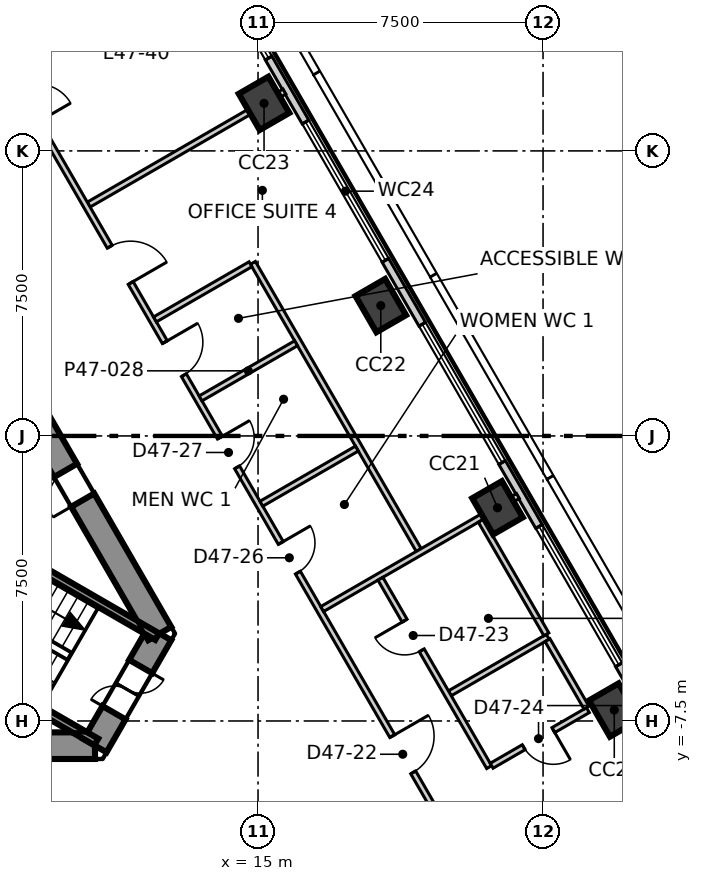
"""IFC4 building model, lengths in metres.
Left out: names, types, materials, properties, quantities, classifications, styles, units other than length and angle.
Written with IfcOpenShell. Run it as: python <this file> out.ifc"""

import sys

from ifc_helpers import new_model, si_unit, direction, frame, frame_2d, origin, origin_2d, place, context, subcontext, project, spatial, polyline, rectangle, outline, extrude, element, fill, save


model = new_model("IFC4")
c1 = context("Model", 3, precision=1e-05, world=origin(), true_north=direction((0.0, 1.0)))
c2 = subcontext(c1, "Body", "Model", "MODEL_VIEW")
j1 = project(units=[si_unit("LENGTHUNIT", "METRE"), si_unit("PLANEANGLEUNIT", "RADIAN")], contexts=[c1])
p1 = place(None, origin())
s1 = spatial("IfcSite", under=j1, at=p1, CompositionType="ELEMENT")
p2 = place(p1, origin())
s2 = spatial("IfcBuilding", under=s1, at=p2, CompositionType="ELEMENT")
p3 = place(p2, frame((0.0, 0.0, 203.3)))
s3 = spatial("IfcBuildingStorey", under=s2, at=p3, CompositionType="ELEMENT", Elevation=203.3)
p4 = place(p3, frame((-10.71, -8.15, -0.3), z_axis=(0.0, 0.0, 1.0), x_axis=(1.0, 0.0, 0.0)))
e1 = element("IfcWall", 1, at=p4, inside=s3, PredefinedType="SHEAR", context=c2, shape_type="SweptSolid", body=[
    extrude(outline(polyline([(-0.202, -0.35), (1.782, -0.35), (3.766, -0.35), (5.75, -0.35), (7.734, -0.35), (9.718, -0.35), (11.702, -0.35), (13.686, -0.35), (15.67, -0.35), (17.654, -0.35), (19.638, -0.35), (21.622, -0.35), (21.218, 0.35), (19.307, 0.35), (17.397, 0.35), (15.486, 0.35), (13.576, 0.35), (11.665, 0.35), (9.755, 0.35), (7.844, 0.35), (5.934, 0.35), (4.023, 0.35), (2.113, 0.35), (0.202, 0.35), (-0.202, -0.35)])), origin(), (0.0, 0.0, 1.0), 4.0),
])
p5 = place(p4, frame((9.81, 0.0, 0.3)))
e2 = element("IfcOpeningElement", 2, at=p5, cuts=e1, PredefinedType="OPENING", context=c2, shape_type="SweptSolid", body=[
    extrude(rectangle(XDim=1.8, YDim=2.1, at=frame_2d((0.9, 1.05))), frame((0.0, 0.36, 0.0), z_axis=(0.0, -1.0, 0.0), x_axis=(1.0, 0.0, 0.0)), (0.0, 0.0, 1.0), 0.72),
])
p6 = place(p3, frame((10.71, -8.15, -0.3), z_axis=(0.0, 0.0, 1.0), x_axis=(0.49999337185, 0.866029230515, 0.0)))
e3 = element("IfcWall", 3, at=p6, inside=s3, PredefinedType="SHEAR", context=c2, shape_type="SweptSolid", body=[
    extrude(outline(polyline([(-0.202, -0.35), (1.703, -0.35), (3.608, -0.35), (3.204, 0.35), (1.703, 0.35), (0.202, 0.35), (-0.202, -0.35)])), origin(), (0.0, 0.0, 1.0), 4.0),
])
p7 = place(p6, frame((1.003, 0.0, 0.3)))
e4 = element("IfcOpeningElement", 4, at=p7, cuts=e3, PredefinedType="OPENING", context=c2, shape_type="SweptSolid", body=[
    extrude(rectangle(XDim=1.4, YDim=2.1, at=frame_2d((0.7, 1.05))), frame((0.0, 0.36, 0.0), z_axis=(0.0, -1.0, 0.0), x_axis=(1.0, 0.0, 0.0)), (0.0, 0.0, 1.0), 0.72),
])
p8 = place(p3, frame((12.413, -5.2, -0.3), z_axis=(0.0, 0.0, 1.0), x_axis=(-0.500011533395, 0.866018744874, 0.0)))
e5 = element("IfcWall", 5, at=p8, inside=s3, PredefinedType="SHEAR", context=c2, shape_type="SweptSolid", body=[
    extrude(outline(polyline([(-0.202, -0.35), (1.782, -0.35), (3.766, -0.35), (5.75, -0.35), (7.734, -0.35), (9.718, -0.35), (11.702, -0.35), (13.686, -0.35), (15.67, -0.35), (17.654, -0.35), (19.638, -0.35), (21.622, -0.35), (21.218, 0.35), (19.307, 0.35), (17.397, 0.35), (15.486, 0.35), (13.576, 0.35), (11.665, 0.35), (9.755, 0.35), (7.844, 0.35), (5.934, 0.35), (4.023, 0.35), (2.113, 0.35), (0.202, 0.35), (-0.202, -0.35)])), origin(), (0.0, 0.0, 1.0), 4.0),
])
p9 = place(p8, frame((4.055, 0.0, 0.3)))
e6 = element("IfcOpeningElement", 6, at=p9, cuts=e5, PredefinedType="OPENING", context=c2, shape_type="SweptSolid", body=[
    extrude(rectangle(XDim=0.9, YDim=2.1, at=frame_2d((0.45, 1.05))), frame((0.0, 0.36, 0.0), z_axis=(0.0, -1.0, 0.0), x_axis=(1.0, 0.0, 0.0)), (0.0, 0.0, 1.0), 0.72),
])
p10 = place(p8, frame((16.415, 0.0, 0.3)))
e7 = element("IfcOpeningElement", 7, at=p10, cuts=e5, PredefinedType="OPENING", context=c2, shape_type="SweptSolid", body=[
    extrude(rectangle(XDim=1.0, YDim=2.1, at=frame_2d((0.5, 1.05))), frame((0.0, 0.36, 0.0), z_axis=(0.0, -1.0, 0.0), x_axis=(1.0, 0.0, 0.0)), (0.0, 0.0, 1.0), 0.72),
])
for number, where, z_axis, x_axis in (
    (8, (24.374, -7.212, -0.3), (0.0, 0.0, 1.0), (-0.5, 0.866, 0.0)),
    (9, (21.302, -1.891, -0.3), (0.0, 0.0, 1.0), (-0.5, 0.866, 0.0)),
    (10, (18.23, 3.43, -0.3), (0.0, 0.0, 1.0), (-0.5, 0.866, 0.0)),
    (11, (15.158, 8.751, -0.3), (0.0, 0.0, 1.0), (-0.5, 0.866, 0.0)),
):
    element("IfcColumn", number, at=place(p3, frame(where, z_axis=z_axis, x_axis=x_axis)), inside=s3, PredefinedType="COLUMN", context=c2, shape_type="SweptSolid", body=[
        extrude(rectangle(XDim=1.1, YDim=0.9, at=origin_2d()), origin(), (0.0, 0.0, 1.0), 4.0),
    ])
p11 = place(p3, frame((28.704, -13.311, 0.0), z_axis=(0.0, 0.0, 1.0), x_axis=(-0.500010281129, 0.866019467891, 0.0)))
e12 = element("IfcWall", 12, at=p11, inside=s3, PredefinedType="ELEMENTEDWALL", context=c2, shape_type="SweptSolid", body=[
    extrude(rectangle(XDim=51.739, YDim=0.2, at=frame_2d((25.87, 0.0))), origin(), (0.0, 0.0, 1.0), 3.7),
])
p12 = place(p11, frame((2.275, 0.0, 0.9)))
e13 = element("IfcOpeningElement", 13, at=p12, cuts=e12, PredefinedType="OPENING", context=c2, shape_type="SweptSolid", body=[
    extrude(rectangle(XDim=4.2, YDim=2.5, at=frame_2d((2.1, 1.25))), frame((0.0, 0.11, 0.0), z_axis=(0.0, -1.0, 0.0), x_axis=(1.0, 0.0, 0.0)), (0.0, 0.0, 1.0), 0.22),
])
p13 = place(p11, frame((8.419, 0.0, 0.9)))
e14 = element("IfcOpeningElement", 14, at=p13, cuts=e12, PredefinedType="OPENING", context=c2, shape_type="SweptSolid", body=[
    extrude(rectangle(XDim=4.2, YDim=2.5, at=frame_2d((2.1, 1.25))), frame((0.0, 0.11, 0.0), z_axis=(0.0, -1.0, 0.0), x_axis=(1.0, 0.0, 0.0)), (0.0, 0.0, 1.0), 0.22),
])
p14 = place(p11, frame((14.563, 0.0, 0.9)))
e15 = element("IfcOpeningElement", 15, at=p14, cuts=e12, PredefinedType="OPENING", context=c2, shape_type="SweptSolid", body=[
    extrude(rectangle(XDim=4.2, YDim=2.5, at=frame_2d((2.1, 1.25))), frame((0.0, 0.11, 0.0), z_axis=(0.0, -1.0, 0.0), x_axis=(1.0, 0.0, 0.0)), (0.0, 0.0, 1.0), 0.22),
])
p15 = place(p11, frame((20.707, 0.0, 0.9)))
e16 = element("IfcOpeningElement", 16, at=p15, cuts=e12, PredefinedType="OPENING", context=c2, shape_type="SweptSolid", body=[
    extrude(rectangle(XDim=4.2, YDim=2.5, at=frame_2d((2.1, 1.25))), frame((0.0, 0.11, 0.0), z_axis=(0.0, -1.0, 0.0), x_axis=(1.0, 0.0, 0.0)), (0.0, 0.0, 1.0), 0.22),
])
p16 = place(p11, frame((26.852, 0.0, 0.9)))
e17 = element("IfcOpeningElement", 17, at=p16, cuts=e12, PredefinedType="OPENING", context=c2, shape_type="SweptSolid", body=[
    extrude(rectangle(XDim=4.2, YDim=2.5, at=frame_2d((2.1, 1.25))), frame((0.0, 0.11, 0.0), z_axis=(0.0, -1.0, 0.0), x_axis=(1.0, 0.0, 0.0)), (0.0, 0.0, 1.0), 0.22),
])
p17 = place(p11, frame((32.996, 0.0, 0.9)))
e18 = element("IfcOpeningElement", 18, at=p17, cuts=e12, PredefinedType="OPENING", context=c2, shape_type="SweptSolid", body=[
    extrude(rectangle(XDim=4.2, YDim=2.5, at=frame_2d((2.1, 1.25))), frame((0.0, 0.11, 0.0), z_axis=(0.0, -1.0, 0.0), x_axis=(1.0, 0.0, 0.0)), (0.0, 0.0, 1.0), 0.22),
])
p18 = place(p11, frame((39.14, 0.0, 0.9)))
e19 = element("IfcOpeningElement", 19, at=p18, cuts=e12, PredefinedType="OPENING", context=c2, shape_type="SweptSolid", body=[
    extrude(rectangle(XDim=4.2, YDim=2.5, at=frame_2d((2.1, 1.25))), frame((0.0, 0.11, 0.0), z_axis=(0.0, -1.0, 0.0), x_axis=(1.0, 0.0, 0.0)), (0.0, 0.0, 1.0), 0.22),
])
p19 = place(p11, frame((45.284, 0.0, 0.9)))
e20 = element("IfcOpeningElement", 20, at=p19, cuts=e12, PredefinedType="OPENING", context=c2, shape_type="SweptSolid", body=[
    extrude(rectangle(XDim=4.2, YDim=2.5, at=frame_2d((2.1, 1.25))), frame((0.0, 0.11, 0.0), z_axis=(0.0, -1.0, 0.0), x_axis=(1.0, 0.0, 0.0)), (0.0, 0.0, 1.0), 0.22),
])
p20 = place(p3, frame((10.544, 6.087, 0.0), z_axis=(0.0, 0.0, 1.0), x_axis=(0.866016753976, 0.500014981608, 0.0)))
e21 = element("IfcWall", 21, at=p20, inside=s3, PredefinedType="PARTITIONING", context=c2, shape_type="SweptSolid", body=[
    extrude(rectangle(XDim=5.948, YDim=0.15, at=frame_2d((2.974, 0.0))), origin(), (0.0, 0.0, 1.0), 3.2),
])
p21 = place(p3, frame((0.075, 24.07, 0.0), z_axis=(0.0, 0.0, 1.0), x_axis=(0.500006834213, -0.866021458014, 0.0)))
e22 = element("IfcWall", 22, at=p21, inside=s3, PredefinedType="PARTITIONING", context=c2, shape_type="SweptSolid", body=[
    extrude(rectangle(XDim=41.616, YDim=0.15, at=frame_2d((20.808, 0.0))), origin(), (0.0, 0.0, 1.0), 3.7),
])
p22 = place(p21, frame((36.915, 0.0, 0.0)))
e23 = element("IfcOpeningElement", 23, at=p22, cuts=e22, PredefinedType="OPENING", context=c2, shape_type="SweptSolid", body=[
    extrude(rectangle(XDim=1.1, YDim=2.1, at=frame_2d((0.55, 1.05))), frame((0.0, 0.085, 0.0), z_axis=(0.0, -1.0, 0.0), x_axis=(1.0, 0.0, 0.0)), (0.0, 0.0, 1.0), 0.17),
])
p23 = place(p21, frame((22.046, 0.0, 0.0)))
e24 = element("IfcOpeningElement", 24, at=p23, cuts=e22, PredefinedType="OPENING", context=c2, shape_type="SweptSolid", body=[
    extrude(rectangle(XDim=1.1, YDim=2.1, at=frame_2d((0.55, 1.05))), frame((0.0, 0.085, 0.0), z_axis=(0.0, -1.0, 0.0), x_axis=(1.0, 0.0, 0.0)), (0.0, 0.0, 1.0), 0.17),
])
p24 = place(p21, frame((31.046, 0.0, 0.0)))
e25 = element("IfcOpeningElement", 25, at=p24, cuts=e22, PredefinedType="OPENING", context=c2, shape_type="SweptSolid", body=[
    extrude(rectangle(XDim=0.9, YDim=2.1, at=frame_2d((0.45, 1.05))), frame((0.0, 0.085, 0.0), z_axis=(0.0, -1.0, 0.0), x_axis=(1.0, 0.0, 0.0)), (0.0, 0.0, 1.0), 0.17),
])
p25 = place(p21, frame((27.846, 0.0, 0.0)))
e26 = element("IfcOpeningElement", 26, at=p25, cuts=e22, PredefinedType="OPENING", context=c2, shape_type="SweptSolid", body=[
    extrude(rectangle(XDim=0.9, YDim=2.1, at=frame_2d((0.45, 1.05))), frame((0.0, 0.085, 0.0), z_axis=(0.0, -1.0, 0.0), x_axis=(1.0, 0.0, 0.0)), (0.0, 0.0, 1.0), 0.17),
])
p26 = place(p21, frame((24.946, 0.0, 0.0)))
e27 = element("IfcOpeningElement", 27, at=p26, cuts=e22, PredefinedType="OPENING", context=c2, shape_type="SweptSolid", body=[
    extrude(rectangle(XDim=1.0, YDim=2.1, at=frame_2d((0.5, 1.05))), frame((0.0, 0.085, 0.0), z_axis=(0.0, -1.0, 0.0), x_axis=(1.0, 0.0, 0.0)), (0.0, 0.0, 1.0), 0.17),
])
p27 = place(p21, frame((17.258, 0.0, 0.0)))
e28 = element("IfcOpeningElement", 28, at=p27, cuts=e22, PredefinedType="OPENING", context=c2, shape_type="SweptSolid", body=[
    extrude(rectangle(XDim=1.0, YDim=2.1, at=frame_2d((0.5, 1.05))), frame((0.0, 0.085, 0.0), z_axis=(0.0, -1.0, 0.0), x_axis=(1.0, 0.0, 0.0)), (0.0, 0.0, 1.0), 0.17),
])
p28 = place(p21, frame((11.114, 0.0, 0.0)))
e29 = element("IfcOpeningElement", 29, at=p28, cuts=e22, PredefinedType="OPENING", context=c2, shape_type="SweptSolid", body=[
    extrude(rectangle(XDim=1.0, YDim=2.1, at=frame_2d((0.5, 1.05))), frame((0.0, 0.085, 0.0), z_axis=(0.0, -1.0, 0.0), x_axis=(1.0, 0.0, 0.0)), (0.0, 0.0, 1.0), 0.17),
])
p29 = place(p21, frame((3.669, 0.0, 0.0)))
e30 = element("IfcOpeningElement", 30, at=p29, cuts=e22, PredefinedType="OPENING", context=c2, shape_type="SweptSolid", body=[
    extrude(rectangle(XDim=1.0, YDim=2.1, at=frame_2d((0.5, 1.05))), frame((0.0, 0.085, 0.0), z_axis=(0.0, -1.0, 0.0), x_axis=(1.0, 0.0, 0.0)), (0.0, 0.0, 1.0), 0.17),
])
p30 = place(p3, frame((14.865, 4.554, 0.0), z_axis=(0.0, 0.0, 1.0), x_axis=(0.500054279689, -0.865994063124, 0.0)))
e31 = element("IfcWall", 31, at=p30, inside=s3, PredefinedType="PARTITIONING", context=c2, shape_type="SweptSolid", body=[
    extrude(rectangle(XDim=8.725, YDim=0.15, at=frame_2d((4.363, 0.0))), origin(), (0.0, 0.0, 1.0), 3.7),
])
p31 = place(p3, frame((12.288, 3.066, 0.0), z_axis=(0.0, 0.0, 1.0), x_axis=(0.865976813117, 0.500084152062, 0.0)))
e32 = element("IfcWall", 32, at=p31, inside=s3, PredefinedType="PARTITIONING", context=c2, shape_type="SweptSolid", body=[
    extrude(rectangle(XDim=2.902, YDim=0.15, at=frame_2d((1.451, 0.0))), origin(), (0.0, 0.0, 1.0), 3.7),
])
p32 = place(p3, frame((13.488, 0.988, 0.0), z_axis=(0.0, 0.0, 1.0), x_axis=(0.866158966803, 0.499768590677, 0.0)))
e33 = element("IfcWall", 33, at=p32, inside=s3, PredefinedType="PARTITIONING", context=c2, shape_type="SweptSolid", body=[
    extrude(rectangle(XDim=2.901, YDim=0.15, at=frame_2d((1.451, 0.0))), origin(), (0.0, 0.0, 1.0), 3.7),
])
p33 = place(p3, frame((15.088, -1.784, 0.0), z_axis=(0.0, 0.0, 1.0), x_axis=(0.866034280428, 0.499984624887, 0.0)))
e34 = element("IfcWall", 34, at=p33, inside=s3, PredefinedType="PARTITIONING", context=c2, shape_type="SweptSolid", body=[
    extrude(rectangle(XDim=2.902, YDim=0.15, at=frame_2d((1.451, 0.0))), origin(), (0.0, 0.0, 1.0), 3.7),
])
p34 = place(p3, frame((16.688, -4.555, 0.0), z_axis=(0.0, 0.0, 1.0), x_axis=(0.866034527326, 0.49998419723, 0.0)))
e35 = element("IfcWall", 35, at=p34, inside=s3, PredefinedType="PARTITIONING", context=c2, shape_type="SweptSolid", body=[
    extrude(rectangle(XDim=5.948, YDim=0.15, at=frame_2d((2.974, 0.0))), origin(), (0.0, 0.0, 1.0), 3.7),
])
p35 = place(p3, frame((20.047, -6.772, 0.0), z_axis=(0.0, 0.0, 1.0), x_axis=(0.865987462095, 0.500065711177, 0.0)))
e36 = element("IfcWall", 36, at=p35, inside=s3, PredefinedType="PARTITIONING", context=c2, shape_type="SweptSolid", body=[
    extrude(rectangle(XDim=2.976, YDim=0.15, at=frame_2d((1.488, 0.0))), origin(), (0.0, 0.0, 1.0), 3.7),
])
p36 = place(p3, frame((20.862, -2.232, 0.0), z_axis=(0.0, 0.0, 1.0), x_axis=(0.499936846106, -0.866061862632, 0.0)))
e37 = element("IfcWall", 37, at=p36, inside=s3, PredefinedType="PARTITIONING", context=c2, shape_type="SweptSolid", body=[
    extrude(rectangle(XDim=3.45, YDim=0.15, at=frame_2d((1.725, 0.0))), origin(), (0.0, 0.0, 1.0), 3.7),
])
p37 = place(p3, frame((18.22, -3.757, 0.0), z_axis=(0.0, 0.0, 1.0), x_axis=(0.499941490393, -0.866059181686, 0.0)))
e38 = element("IfcWall", 38, at=p37, inside=s3, PredefinedType="PARTITIONING", context=c2, shape_type="SweptSolid", body=[
    extrude(rectangle(XDim=5.725, YDim=0.15, at=frame_2d((2.862, 0.0))), origin(), (0.0, 0.0, 1.0), 3.7),
])
p38 = place(p37, frame((1.275, 0.0, 0.0)))
e39 = element("IfcOpeningElement", 39, at=p38, cuts=e38, PredefinedType="OPENING", context=c2, shape_type="SweptSolid", body=[
    extrude(rectangle(XDim=0.9, YDim=2.1, at=frame_2d((0.45, 1.05))), frame((0.0, 0.085, 0.0), z_axis=(0.0, -1.0, 0.0), x_axis=(1.0, 0.0, 0.0)), (0.0, 0.0, 1.0), 0.17),
])
p39 = place(p3, frame((21.147, -8.678, 0.0), z_axis=(0.0, 0.0, 1.0), x_axis=(0.865953438489, 0.500124626836, 0.0)))
e40 = element("IfcWall", 40, at=p39, inside=s3, PredefinedType="PARTITIONING", context=c2, shape_type="SweptSolid", body=[
    extrude(rectangle(XDim=2.925, YDim=0.15, at=frame_2d((1.462, 0.0))), origin(), (0.0, 0.0, 1.0), 3.7),
])
p40 = place(p39, frame((0.975, 0.0, 0.0)))
e41 = element("IfcOpeningElement", 41, at=p40, cuts=e40, PredefinedType="OPENING", context=c2, shape_type="SweptSolid", body=[
    extrude(rectangle(XDim=0.9, YDim=2.1, at=frame_2d((0.45, 1.05))), frame((0.0, 0.085, 0.0), z_axis=(0.0, -1.0, 0.0), x_axis=(1.0, 0.0, 0.0)), (0.0, 0.0, 1.0), 0.17),
])
p41 = place(p3, frame((22.618, -5.375, 0.0), z_axis=(0.0, 0.0, 1.0), x_axis=(0.50014860279, -0.865939590923, 0.0)))
e42 = element("IfcWall", 42, at=p41, inside=s3, PredefinedType="PARTITIONING", context=c2, shape_type="SweptSolid", body=[
    extrude(rectangle(XDim=2.05, YDim=0.15, at=frame_2d((1.025, 0.0))), origin(), (0.0, 0.0, 1.0), 3.7),
])
p42 = place(p3, frame((4.929, -4.693, 0.0), z_axis=(0.0, 0.0, 1.0), x_axis=(0.865983344943, -0.500072840975, 0.0)))
e43 = element("IfcWall", 43, at=p42, inside=s3, PredefinedType="SOLIDWALL", context=c2, shape_type="SweptSolid", body=[
    extrude(rectangle(XDim=6.715, YDim=0.2, at=frame_2d((3.357, 0.0))), origin(), (0.0, 0.0, 1.0), 3.7),
])
p43 = place(p3, frame((6.529, -1.922, 0.0), z_axis=(0.0, 0.0, 1.0), x_axis=(0.866046323291, -0.499963764601, 0.0)))
e44 = element("IfcWall", 44, at=p43, inside=s3, PredefinedType="SOLIDWALL", context=c2, shape_type="SweptSolid", body=[
    extrude(rectangle(XDim=6.714, YDim=0.2, at=frame_2d((3.357, 0.0))), origin(), (0.0, 0.0, 1.0), 3.7),
])
p44 = place(p13, origin())
e45 = element("IfcWindow", 45, at=p44, inside=s3, PartitioningType="SINGLE_PANEL", PredefinedType="WINDOW", context=c2, shape_type="SweptSolid", body=[
    extrude(rectangle(XDim=4.2, YDim=2.5, at=frame_2d((2.1, 1.25))), frame((0.0, 0.03, 0.0), z_axis=(0.0, -1.0, 0.0), x_axis=(1.0, 0.0, 0.0)), (0.0, 0.0, 1.0), 0.06),
])
fill(e14, e45)
p45 = place(p14, origin())
e46 = element("IfcWindow", 46, at=p45, inside=s3, PartitioningType="SINGLE_PANEL", PredefinedType="WINDOW", context=c2, shape_type="SweptSolid", body=[
    extrude(rectangle(XDim=4.2, YDim=2.5, at=frame_2d((2.1, 1.25))), frame((0.0, 0.03, 0.0), z_axis=(0.0, -1.0, 0.0), x_axis=(1.0, 0.0, 0.0)), (0.0, 0.0, 1.0), 0.06),
])
fill(e15, e46)
p46 = place(p15, origin())
e47 = element("IfcWindow", 47, at=p46, inside=s3, PartitioningType="SINGLE_PANEL", PredefinedType="WINDOW", context=c2, shape_type="SweptSolid", body=[
    extrude(rectangle(XDim=4.2, YDim=2.5, at=frame_2d((2.1, 1.25))), frame((0.0, 0.03, 0.0), z_axis=(0.0, -1.0, 0.0), x_axis=(1.0, 0.0, 0.0)), (0.0, 0.0, 1.0), 0.06),
])
fill(e16, e47)
p47 = place(p16, origin())
e48 = element("IfcWindow", 48, at=p47, inside=s3, PartitioningType="SINGLE_PANEL", PredefinedType="WINDOW", context=c2, shape_type="SweptSolid", body=[
    extrude(rectangle(XDim=4.2, YDim=2.5, at=frame_2d((2.1, 1.25))), frame((0.0, 0.03, 0.0), z_axis=(0.0, -1.0, 0.0), x_axis=(1.0, 0.0, 0.0)), (0.0, 0.0, 1.0), 0.06),
])
fill(e17, e48)
p48 = place(p22, origin())
e49 = element("IfcDoor", 49, at=p48, inside=s3, OperationType="SINGLE_SWING_RIGHT", PredefinedType="DOOR", context=c2, shape_type="SweptSolid", body=[
    extrude(rectangle(XDim=1.1, YDim=2.1, at=frame_2d((0.55, 1.05))), frame((0.0, 0.025, 0.0), z_axis=(0.0, -1.0, 0.0), x_axis=(1.0, 0.0, 0.0)), (0.0, 0.0, 1.0), 0.05),
])
fill(e23, e49)
p49 = place(p38, origin())
e50 = element("IfcDoor", 50, at=p49, inside=s3, OperationType="SINGLE_SWING_LEFT", PredefinedType="DOOR", context=c2, shape_type="SweptSolid", body=[
    extrude(rectangle(XDim=0.9, YDim=2.1, at=frame_2d((0.45, 1.05))), frame((0.0, 0.025, 0.0), z_axis=(0.0, -1.0, 0.0), x_axis=(1.0, 0.0, 0.0)), (0.0, 0.0, 1.0), 0.05),
])
fill(e39, e50)
p50 = place(p40, origin())
e51 = element("IfcDoor", 51, at=p50, inside=s3, OperationType="SINGLE_SWING_RIGHT", PredefinedType="DOOR", context=c2, shape_type="SweptSolid", body=[
    extrude(rectangle(XDim=0.9, YDim=2.1, at=frame_2d((0.45, 1.05))), frame((0.0, 0.025, 0.0), z_axis=(0.0, -1.0, 0.0), x_axis=(1.0, 0.0, 0.0)), (0.0, 0.0, 1.0), 0.05),
])
fill(e41, e51)
p51 = place(p23, origin())
e52 = element("IfcDoor", 52, at=p51, inside=s3, OperationType="SINGLE_SWING_LEFT", PredefinedType="DOOR", context=c2, shape_type="SweptSolid", body=[
    extrude(rectangle(XDim=1.1, YDim=2.1, at=frame_2d((0.55, 1.05))), frame((0.0, 0.025, 0.0), z_axis=(0.0, -1.0, 0.0), x_axis=(1.0, 0.0, 0.0)), (0.0, 0.0, 1.0), 0.05),
])
fill(e24, e52)
p52 = place(p24, origin())
e53 = element("IfcDoor", 53, at=p52, inside=s3, OperationType="SINGLE_SWING_RIGHT", PredefinedType="DOOR", context=c2, shape_type="SweptSolid", body=[
    extrude(rectangle(XDim=0.9, YDim=2.1, at=frame_2d((0.45, 1.05))), frame((0.0, 0.025, 0.0), z_axis=(0.0, -1.0, 0.0), x_axis=(1.0, 0.0, 0.0)), (0.0, 0.0, 1.0), 0.05),
])
fill(e25, e53)
p53 = place(p25, origin())
e54 = element("IfcDoor", 54, at=p53, inside=s3, OperationType="SINGLE_SWING_RIGHT", PredefinedType="DOOR", context=c2, shape_type="SweptSolid", body=[
    extrude(rectangle(XDim=0.9, YDim=2.1, at=frame_2d((0.45, 1.05))), frame((0.0, 0.025, 0.0), z_axis=(0.0, -1.0, 0.0), x_axis=(1.0, 0.0, 0.0)), (0.0, 0.0, 1.0), 0.05),
])
fill(e26, e54)
p54 = place(p26, origin())
e55 = element("IfcDoor", 55, at=p54, inside=s3, OperationType="SINGLE_SWING_RIGHT", PredefinedType="DOOR", context=c2, shape_type="SweptSolid", body=[
    extrude(rectangle(XDim=1.0, YDim=2.1, at=frame_2d((0.5, 1.05))), frame((0.0, 0.025, 0.0), z_axis=(0.0, -1.0, 0.0), x_axis=(1.0, 0.0, 0.0)), (0.0, 0.0, 1.0), 0.05),
])
fill(e27, e55)
p55 = place(p7, origin())
e56 = element("IfcDoor", 56, at=p55, inside=s3, OperationType="DOUBLE_DOOR_SINGLE_SWING", PredefinedType="DOOR", context=c2, shape_type="SweptSolid", body=[
    extrude(rectangle(XDim=1.4, YDim=2.1, at=frame_2d((0.7, 1.05))), frame((0.0, 0.025, 0.0), z_axis=(0.0, -1.0, 0.0), x_axis=(1.0, 0.0, 0.0)), (0.0, 0.0, 1.0), 0.05),
])
fill(e4, e56)
p56 = place(p9, origin())
e57 = element("IfcDoor", 57, at=p56, inside=s3, OperationType="SINGLE_SWING_RIGHT", PredefinedType="DOOR", context=c2, shape_type="SweptSolid", body=[
    extrude(rectangle(XDim=0.9, YDim=2.1, at=frame_2d((0.45, 1.05))), frame((0.0, 0.025, 0.0), z_axis=(0.0, -1.0, 0.0), x_axis=(1.0, 0.0, 0.0)), (0.0, 0.0, 1.0), 0.05),
])
fill(e6, e57)
save(model, sys.argv[1])
